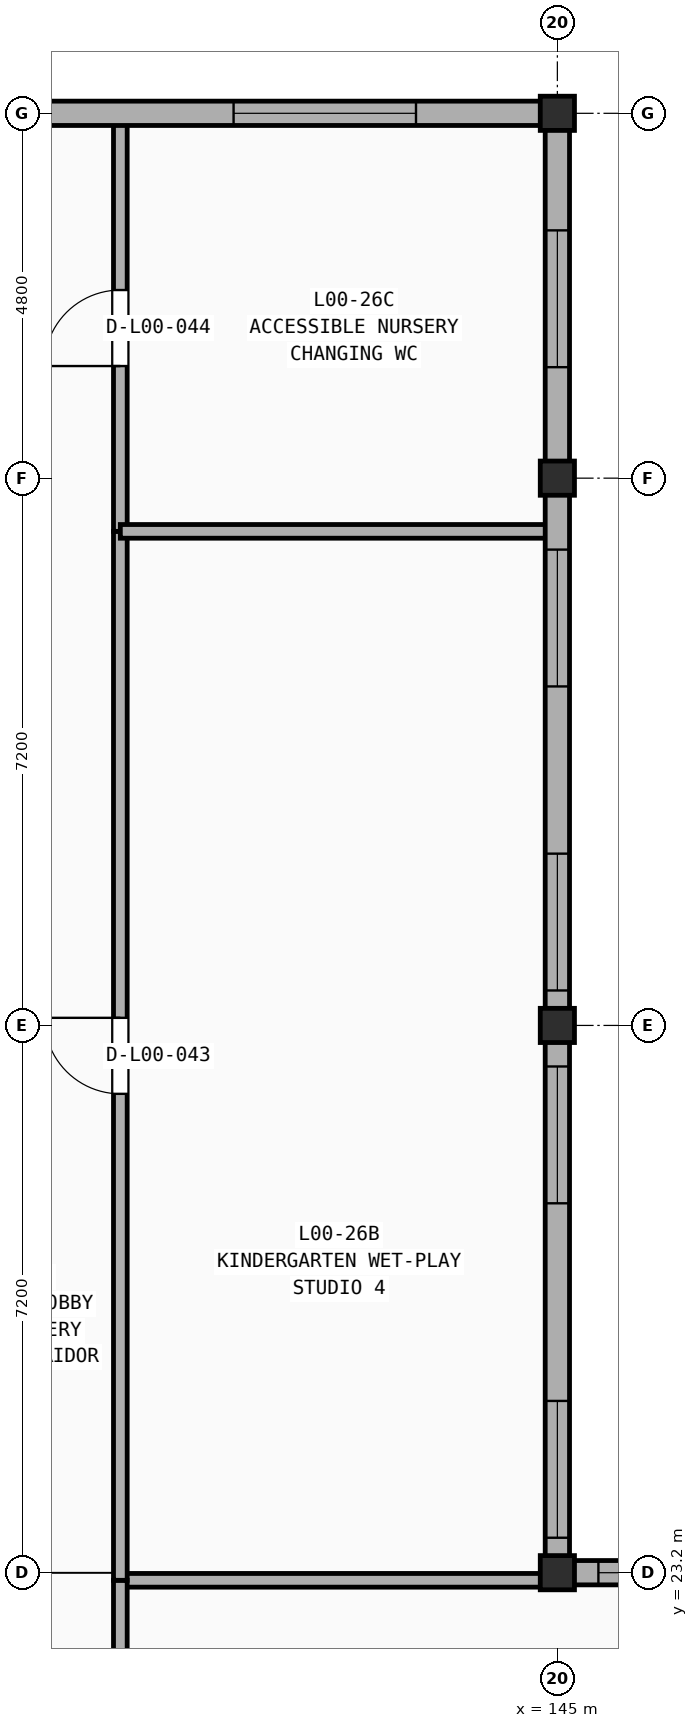
"""IFC4 building model, lengths in metres.
Left out: names, types, materials, properties, quantities, classifications, styles, units other than length and angle.
Written with IfcOpenShell. Run it as: python <this file> out.ifc"""

import sys

from ifc_helpers import new_model, si_unit, direction, frame, frame_2d, origin, origin_2d, place, context, subcontext, project, spatial, rectangle, extrude, element, fill, save


model = new_model("IFC4")
c1 = context("Model", 3, precision=1e-05, world=origin(), true_north=direction((0.0, 1.0)))
c2 = subcontext(c1, "Body", "Model", "MODEL_VIEW")
j1 = project(units=[si_unit("LENGTHUNIT", "METRE"), si_unit("PLANEANGLEUNIT", "RADIAN")], contexts=[c1])
p1 = place(None, origin())
s1 = spatial("IfcSite", under=j1, at=p1, CompositionType="ELEMENT")
p2 = place(p1, origin())
s2 = spatial("IfcBuilding", under=s1, at=p2, CompositionType="ELEMENT")
p3 = place(p2, origin())
s3 = spatial("IfcBuildingStorey", under=s2, at=p3, CompositionType="ELEMENT", Elevation=0.0)
for number, where, z_axis, x_axis in (
    (1, (145.0, 23.2, 0.0), (0.0, 0.0, 1.0), (1.0, 0.0, 0.0)),
    (2, (145.0, 30.4, 0.0), (0.0, 0.0, 1.0), (1.0, 0.0, 0.0)),
    (3, (145.0, 37.6, 0.0), (0.0, 0.0, 1.0), (1.0, 0.0, 0.0)),
    (4, (145.0, 42.4, 0.0), (0.0, 0.0, 1.0), (1.0, 0.0, 0.0)),
):
    element("IfcColumn", number, at=place(p3, frame(where, z_axis=z_axis, x_axis=x_axis)), inside=s3, PredefinedType="COLUMN", context=c2, shape_type="SweptSolid", body=[
        extrude(rectangle(XDim=0.45, YDim=0.45, at=origin_2d()), origin(), (0.0, 0.0, 1.0), 5.4),
    ])
p4 = place(p3, frame((139.25, 23.1, 0.0), z_axis=(0.0, 0.0, 1.0), x_axis=(1.0, 0.0, 0.0)))
e5 = element("IfcWall", 5, at=p4, inside=s3, PredefinedType="PARTITIONING", context=c2, shape_type="SweptSolid", body=[
    extrude(rectangle(XDim=5.6, YDim=0.18, at=frame_2d((2.8, 0.0))), origin(), (0.0, 0.0, 1.0), 4.64),
])
p5 = place(p3, frame((139.25, 16.65, 0.0), z_axis=(0.0, 0.0, 1.0), x_axis=(0.0, 1.0, 0.0)))
e6 = element("IfcWall", 6, at=p5, inside=s3, PredefinedType="PARTITIONING", context=c2, shape_type="SweptSolid", body=[
    extrude(rectangle(XDim=6.45, YDim=0.18, at=frame_2d((3.225, 0.0))), origin(), (0.0, 0.0, 1.0), 4.64),
])
p6 = place(p3, frame((139.25, 23.1, 0.0), z_axis=(0.0, 0.0, 1.0), x_axis=(0.0, 1.0, 0.0)))
e7 = element("IfcWall", 7, at=p6, inside=s3, PredefinedType="PARTITIONING", context=c2, shape_type="SweptSolid", body=[
    extrude(rectangle(XDim=13.8, YDim=0.18, at=frame_2d((6.9, 0.0))), origin(), (0.0, 0.0, 1.0), 4.54),
])
p7 = place(p6, frame((6.4, 0.0, -0.01)))
e8 = element("IfcOpeningElement", 8, at=p7, cuts=e7, PredefinedType="OPENING", context=c2, shape_type="SweptSolid", body=[
    extrude(rectangle(XDim=1.0, YDim=2.16, at=frame_2d((0.5, 1.08))), frame((0.0, 0.1, 0.0), z_axis=(0.0, -1.0, 0.0), x_axis=(1.0, 0.0, 0.0)), (0.0, 0.0, 1.0), 0.2),
])
p8 = place(p3, frame((139.25, 36.9, 0.0), z_axis=(0.0, 0.0, 1.0), x_axis=(0.0, 1.0, 0.0)))
e9 = element("IfcWall", 9, at=p8, inside=s3, PredefinedType="PARTITIONING", context=c2, shape_type="SweptSolid", body=[
    extrude(rectangle(XDim=5.35, YDim=0.18, at=frame_2d((2.675, 0.0))), origin(), (0.0, 0.0, 1.0), 4.54),
])
p9 = place(p8, frame((2.175, 0.0, -0.01)))
e10 = element("IfcOpeningElement", 10, at=p9, cuts=e9, PredefinedType="OPENING", context=c2, shape_type="SweptSolid", body=[
    extrude(rectangle(XDim=1.0, YDim=2.16, at=frame_2d((0.5, 1.08))), frame((0.0, 0.1, 0.0), z_axis=(0.0, -1.0, 0.0), x_axis=(1.0, 0.0, 0.0)), (0.0, 0.0, 1.0), 0.2),
])
p10 = place(p3, frame((139.25, 36.9, 0.0), z_axis=(0.0, 0.0, 1.0), x_axis=(1.0, 0.0, 0.0)))
e11 = element("IfcWall", 11, at=p10, inside=s3, PredefinedType="PARTITIONING", context=c2, shape_type="SweptSolid", body=[
    extrude(rectangle(XDim=5.6, YDim=0.18, at=frame_2d((2.8, 0.0))), origin(), (0.0, 0.0, 1.0), 4.64),
])
p11 = place(p3, frame((152.8, 23.2, 0.0), z_axis=(0.0, 0.0, 1.0), x_axis=(-1.0, 0.0, 0.0)))
e12 = element("IfcWall", 12, at=p11, inside=s3, PredefinedType="SOLIDWALL", context=c2, shape_type="SweptSolid", body=[
    extrude(rectangle(XDim=7.8, YDim=0.32, at=frame_2d((3.9, 0.0))), origin(), (0.0, 0.0, 1.0), 4.64),
])
p12 = place(p11, frame((0.46, 0.0, 0.9)))
e13 = element("IfcOpeningElement", 13, at=p12, cuts=e12, PredefinedType="OPENING", context=c2, shape_type="SweptSolid", body=[
    extrude(rectangle(XDim=2.4, YDim=2.35, at=frame_2d((1.2, 1.175))), frame((0.0, 0.17, 0.0), z_axis=(0.0, -1.0, 0.0), x_axis=(1.0, 0.0, 0.0)), (0.0, 0.0, 1.0), 0.34),
])
p13 = place(p11, frame((4.86, 0.0, 0.9)))
e14 = element("IfcOpeningElement", 14, at=p13, cuts=e12, PredefinedType="OPENING", context=c2, shape_type="SweptSolid", body=[
    extrude(rectangle(XDim=2.4, YDim=2.35, at=frame_2d((1.2, 1.175))), frame((0.0, 0.17, 0.0), z_axis=(0.0, -1.0, 0.0), x_axis=(1.0, 0.0, 0.0)), (0.0, 0.0, 1.0), 0.34),
])
p14 = place(p3, frame((145.0, 42.4, 0.0), z_axis=(0.0, 0.0, 1.0), x_axis=(-1.0, 0.0, 0.0)))
e15 = element("IfcWall", 15, at=p14, inside=s3, PredefinedType="SOLIDWALL", context=c2, shape_type="SweptSolid", body=[
    extrude(rectangle(XDim=7.8, YDim=0.32, at=frame_2d((3.9, 0.0))), origin(), (0.0, 0.0, 1.0), 4.64),
])
p15 = place(p14, frame((1.86, 0.0, 0.9)))
e16 = element("IfcOpeningElement", 16, at=p15, cuts=e15, PredefinedType="OPENING", context=c2, shape_type="SweptSolid", body=[
    extrude(rectangle(XDim=2.4, YDim=2.35, at=frame_2d((1.2, 1.175))), frame((0.0, 0.17, 0.0), z_axis=(0.0, -1.0, 0.0), x_axis=(1.0, 0.0, 0.0)), (0.0, 0.0, 1.0), 0.34),
])
p16 = place(p3, frame((145.0, 23.2, 0.0), z_axis=(0.0, 0.0, 1.0), x_axis=(0.0, 1.0, 0.0)))
e17 = element("IfcWall", 17, at=p16, inside=s3, PredefinedType="SOLIDWALL", context=c2, shape_type="SweptSolid", body=[
    extrude(rectangle(XDim=7.2, YDim=0.32, at=frame_2d((3.6, 0.0))), origin(), (0.0, 0.0, 1.0), 4.54),
])
p17 = place(p16, frame((0.46, 0.0, 0.9)))
e18 = element("IfcOpeningElement", 18, at=p17, cuts=e17, PredefinedType="OPENING", context=c2, shape_type="SweptSolid", body=[
    extrude(rectangle(XDim=1.8, YDim=2.2, at=frame_2d((0.9, 1.1))), frame((0.0, 0.17, 0.0), z_axis=(0.0, -1.0, 0.0), x_axis=(1.0, 0.0, 0.0)), (0.0, 0.0, 1.0), 0.34),
])
p18 = place(p16, frame((4.86, 0.0, 0.9)))
e19 = element("IfcOpeningElement", 19, at=p18, cuts=e17, PredefinedType="OPENING", context=c2, shape_type="SweptSolid", body=[
    extrude(rectangle(XDim=1.8, YDim=2.2, at=frame_2d((0.9, 1.1))), frame((0.0, 0.17, 0.0), z_axis=(0.0, -1.0, 0.0), x_axis=(1.0, 0.0, 0.0)), (0.0, 0.0, 1.0), 0.34),
])
p19 = place(p3, frame((145.0, 30.4, 0.0), z_axis=(0.0, 0.0, 1.0), x_axis=(0.0, 1.0, 0.0)))
e20 = element("IfcWall", 20, at=p19, inside=s3, PredefinedType="SOLIDWALL", context=c2, shape_type="SweptSolid", body=[
    extrude(rectangle(XDim=7.2, YDim=0.32, at=frame_2d((3.6, 0.0))), origin(), (0.0, 0.0, 1.0), 4.54),
])
p20 = place(p19, frame((0.46, 0.0, 0.9)))
e21 = element("IfcOpeningElement", 21, at=p20, cuts=e20, PredefinedType="OPENING", context=c2, shape_type="SweptSolid", body=[
    extrude(rectangle(XDim=1.8, YDim=2.2, at=frame_2d((0.9, 1.1))), frame((0.0, 0.17, 0.0), z_axis=(0.0, -1.0, 0.0), x_axis=(1.0, 0.0, 0.0)), (0.0, 0.0, 1.0), 0.34),
])
p21 = place(p19, frame((4.46, 0.0, 0.9)))
e22 = element("IfcOpeningElement", 22, at=p21, cuts=e20, PredefinedType="OPENING", context=c2, shape_type="SweptSolid", body=[
    extrude(rectangle(XDim=1.8, YDim=2.2, at=frame_2d((0.9, 1.1))), frame((0.0, 0.17, 0.0), z_axis=(0.0, -1.0, 0.0), x_axis=(1.0, 0.0, 0.0)), (0.0, 0.0, 1.0), 0.34),
])
p22 = place(p3, frame((145.0, 37.6, 0.0), z_axis=(0.0, 0.0, 1.0), x_axis=(0.0, 1.0, 0.0)))
e23 = element("IfcWall", 23, at=p22, inside=s3, PredefinedType="SOLIDWALL", context=c2, shape_type="SweptSolid", body=[
    extrude(rectangle(XDim=4.8, YDim=0.32, at=frame_2d((2.4, 0.0))), origin(), (0.0, 0.0, 1.0), 4.54),
])
p23 = place(p22, frame((1.46, 0.0, 0.9)))
e24 = element("IfcOpeningElement", 24, at=p23, cuts=e23, PredefinedType="OPENING", context=c2, shape_type="SweptSolid", body=[
    extrude(rectangle(XDim=1.8, YDim=2.2, at=frame_2d((0.9, 1.1))), frame((0.0, 0.17, 0.0), z_axis=(0.0, -1.0, 0.0), x_axis=(1.0, 0.0, 0.0)), (0.0, 0.0, 1.0), 0.34),
])
p24 = place(p7, frame((0.0, 0.0, 0.01)))
e25 = element("IfcDoor", 25, at=p24, inside=s3, OperationType="SINGLE_SWING_RIGHT", PredefinedType="DOOR", context=c2, shape_type="SweptSolid", body=[
    extrude(rectangle(XDim=1.0, YDim=2.15, at=frame_2d((0.5, 1.075))), frame((0.0, 0.025, 0.0), z_axis=(0.0, -1.0, 0.0), x_axis=(1.0, 0.0, 0.0)), (0.0, 0.0, 1.0), 0.05),
])
fill(e8, e25)
p25 = place(p9, frame((0.0, 0.0, 0.01)))
e26 = element("IfcDoor", 26, at=p25, inside=s3, OperationType="SINGLE_SWING_LEFT", PredefinedType="DOOR", context=c2, shape_type="SweptSolid", body=[
    extrude(rectangle(XDim=1.0, YDim=2.15, at=frame_2d((0.5, 1.075))), frame((0.0, 0.025, 0.0), z_axis=(0.0, -1.0, 0.0), x_axis=(1.0, 0.0, 0.0)), (0.0, 0.0, 1.0), 0.05),
])
fill(e10, e26)
p26 = place(p13, origin())
e27 = element("IfcWindow", 27, at=p26, inside=s3, PartitioningType="TRIPLE_PANEL_VERTICAL", PredefinedType="WINDOW", context=c2, shape_type="SweptSolid", body=[
    extrude(rectangle(XDim=2.4, YDim=2.35, at=frame_2d((1.2, 1.175))), frame((0.0, 0.03, 0.0), z_axis=(0.0, -1.0, 0.0), x_axis=(1.0, 0.0, 0.0)), (0.0, 0.0, 1.0), 0.06),
])
fill(e14, e27)
p27 = place(p15, origin())
e28 = element("IfcWindow", 28, at=p27, inside=s3, PartitioningType="TRIPLE_PANEL_VERTICAL", PredefinedType="WINDOW", context=c2, shape_type="SweptSolid", body=[
    extrude(rectangle(XDim=2.4, YDim=2.35, at=frame_2d((1.2, 1.175))), frame((0.0, 0.03, 0.0), z_axis=(0.0, -1.0, 0.0), x_axis=(1.0, 0.0, 0.0)), (0.0, 0.0, 1.0), 0.06),
])
fill(e16, e28)
p28 = place(p17, origin())
e29 = element("IfcWindow", 29, at=p28, inside=s3, PartitioningType="DOUBLE_PANEL_VERTICAL", PredefinedType="WINDOW", context=c2, shape_type="SweptSolid", body=[
    extrude(rectangle(XDim=1.8, YDim=2.2, at=frame_2d((0.9, 1.1))), frame((0.0, 0.03, 0.0), z_axis=(0.0, -1.0, 0.0), x_axis=(1.0, 0.0, 0.0)), (0.0, 0.0, 1.0), 0.06),
])
fill(e18, e29)
p29 = place(p18, origin())
e30 = element("IfcWindow", 30, at=p29, inside=s3, PartitioningType="DOUBLE_PANEL_VERTICAL", PredefinedType="WINDOW", context=c2, shape_type="SweptSolid", body=[
    extrude(rectangle(XDim=1.8, YDim=2.2, at=frame_2d((0.9, 1.1))), frame((0.0, 0.03, 0.0), z_axis=(0.0, -1.0, 0.0), x_axis=(1.0, 0.0, 0.0)), (0.0, 0.0, 1.0), 0.06),
])
fill(e19, e30)
p30 = place(p20, origin())
e31 = element("IfcWindow", 31, at=p30, inside=s3, PartitioningType="DOUBLE_PANEL_VERTICAL", PredefinedType="WINDOW", context=c2, shape_type="SweptSolid", body=[
    extrude(rectangle(XDim=1.8, YDim=2.2, at=frame_2d((0.9, 1.1))), frame((0.0, 0.03, 0.0), z_axis=(0.0, -1.0, 0.0), x_axis=(1.0, 0.0, 0.0)), (0.0, 0.0, 1.0), 0.06),
])
fill(e21, e31)
p31 = place(p21, origin())
e32 = element("IfcWindow", 32, at=p31, inside=s3, PartitioningType="DOUBLE_PANEL_VERTICAL", PredefinedType="WINDOW", context=c2, shape_type="SweptSolid", body=[
    extrude(rectangle(XDim=1.8, YDim=2.2, at=frame_2d((0.9, 1.1))), frame((0.0, 0.03, 0.0), z_axis=(0.0, -1.0, 0.0), x_axis=(1.0, 0.0, 0.0)), (0.0, 0.0, 1.0), 0.06),
])
fill(e22, e32)
p32 = place(p23, origin())
e33 = element("IfcWindow", 33, at=p32, inside=s3, PartitioningType="DOUBLE_PANEL_VERTICAL", PredefinedType="WINDOW", context=c2, shape_type="SweptSolid", body=[
    extrude(rectangle(XDim=1.8, YDim=2.2, at=frame_2d((0.9, 1.1))), frame((0.0, 0.03, 0.0), z_axis=(0.0, -1.0, 0.0), x_axis=(1.0, 0.0, 0.0)), (0.0, 0.0, 1.0), 0.06),
])
fill(e24, e33)
save(model, sys.argv[1])
